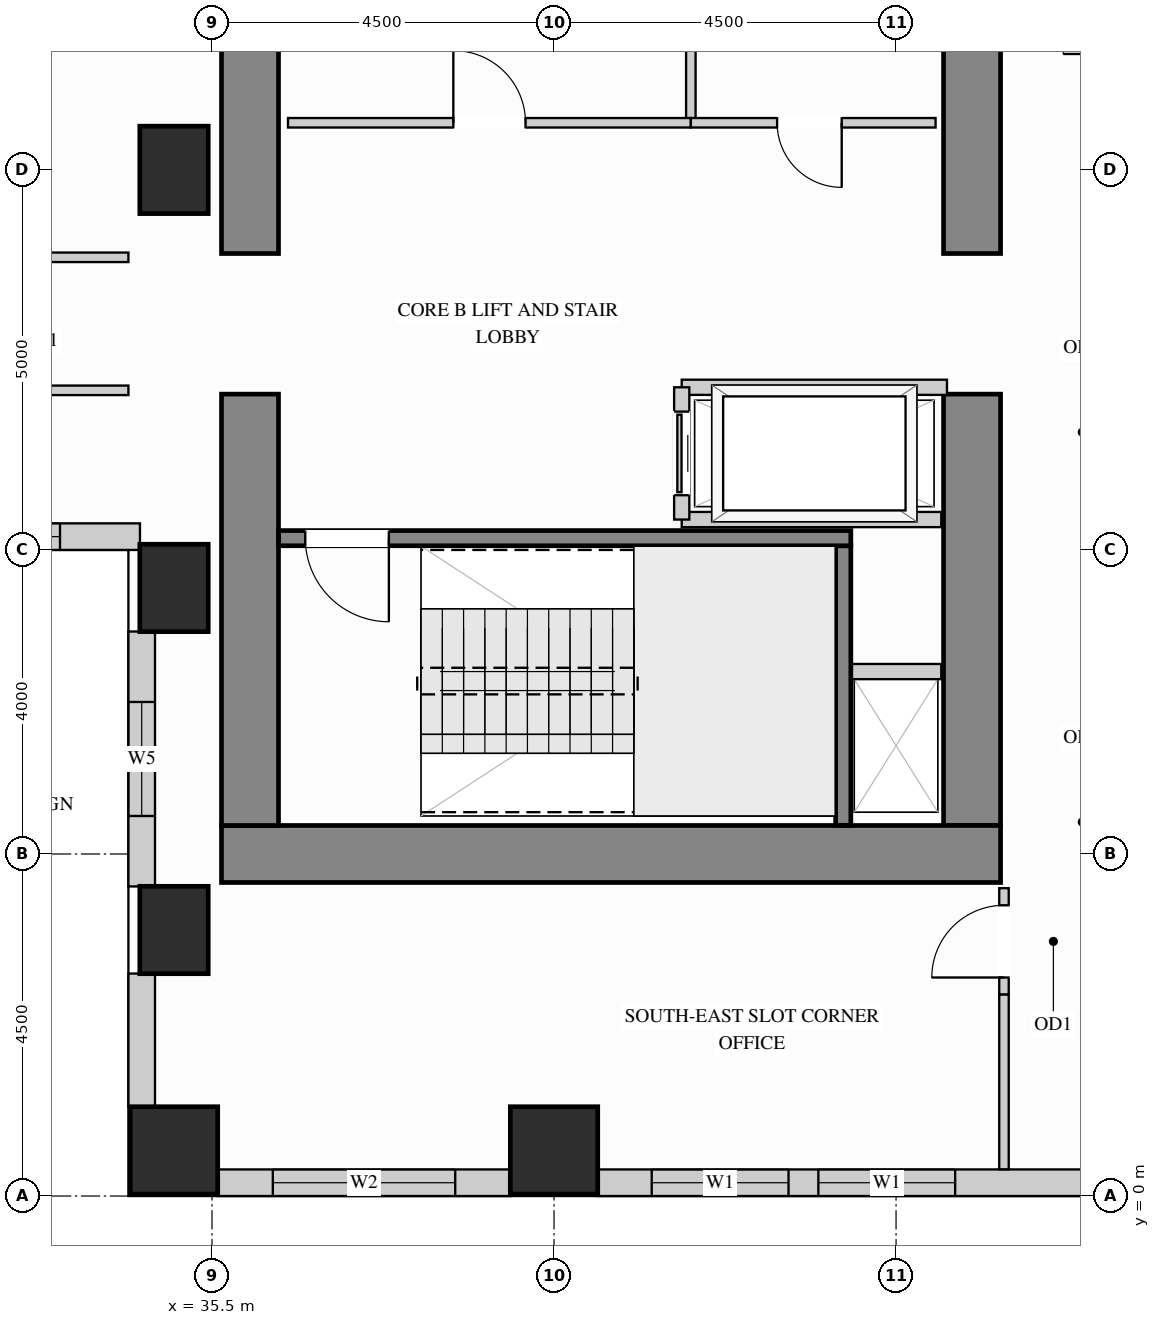
"""IFC4 building model, lengths in metres.
Left out: names, types, materials, properties, quantities, classifications, styles, units other than length and angle.
Written with IfcOpenShell. Run it as: python <this file> out.ifc"""

import sys

from ifc_helpers import new_model, si_unit, direction, frame, frame_2d, origin, origin_2d, place, context, subcontext, project, spatial, rectangle, extrude, source, transform, mapped, element, fill, save


model = new_model("IFC4")
c1 = context("Model", 3, precision=1e-05, world=origin(), true_north=direction((0.0, 1.0)))
c2 = subcontext(c1, "Body", "Model", "MODEL_VIEW")
j1 = project(units=[si_unit("LENGTHUNIT", "METRE"), si_unit("PLANEANGLEUNIT", "RADIAN")], contexts=[c1])
p1 = place(None, origin())
s1 = spatial("IfcSite", under=j1, at=p1, CompositionType="ELEMENT")
p2 = place(p1, origin())
s2 = spatial("IfcBuilding", under=s1, at=p2, CompositionType="ELEMENT")
p3 = place(p2, frame((0.0, 0.0, 109.8)))
s3 = spatial("IfcBuildingStorey", under=s2, at=p3, CompositionType="ELEMENT", Elevation=109.8)
m1 = source(origin(), c2, "Body", "SweptSolid", [
    extrude(rectangle(XDim=0.9, YDim=1.15, at=origin_2d()), origin(), (0.0, 0.0, 1.0), 3.38),
])
for number, where, z_axis, x_axis in (
    (1, (35.0, 13.5, 0.0), (0.0, 0.0, 1.0), (1.0, 0.0, 0.0)),
    (2, (35.0, 3.5, 0.0), (0.0, 0.0, 1.0), (1.0, 0.0, 0.0)),
    (3, (35.0, 8.0, 0.0), (0.0, 0.0, 1.0), (1.0, 0.0, 0.0)),
):
    element("IfcColumn", number, at=place(p3, frame(where, z_axis=z_axis, x_axis=x_axis)), inside=s3, PredefinedType="COLUMN", context=c2, shape_type="MappedRepresentation", body=[
        mapped(m1, transform((0.0, 0.0, 0.0), x_axis=(1.0, 0.0, 0.0), y_axis=(0.0, 1.0, 0.0), z_axis=(0.0, 0.0, 1.0))),
    ])
m2 = source(origin(), c2, "Body", "SweptSolid", [
    extrude(rectangle(XDim=1.15, YDim=1.15, at=origin_2d()), origin(), (0.0, 0.0, 1.0), 3.38),
])
for number, where, z_axis, x_axis in (
    (4, (35.0, 0.6, 0.0), (0.0, 0.0, 1.0), (1.0, 0.0, 0.0)),
    (5, (40.0, 0.6, 0.0), (0.0, 0.0, 1.0), (1.0, 0.0, 0.0)),
):
    element("IfcColumn", number, at=place(p3, frame(where, z_axis=z_axis, x_axis=x_axis)), inside=s3, PredefinedType="COLUMN", context=c2, shape_type="MappedRepresentation", body=[
        mapped(m2, transform((0.0, 0.0, 0.0), x_axis=(1.0, 0.0, 0.0), y_axis=(0.0, 1.0, 0.0), z_axis=(0.0, 0.0, 1.0))),
    ])
m3 = source(origin(), c2, "Body", "SweptSolid", [
    extrude(rectangle(XDim=5.675, YDim=0.75, at=frame_2d((2.837, 0.0))), origin(), (0.0, 0.0, 1.0), 3.38),
])
p4 = place(p3, frame((45.5, 4.875, 0.0), z_axis=(0.0, 0.0, 1.0), x_axis=(0.0, 1.0, 0.0)))
e6 = element("IfcWall", 6, at=p4, inside=s3, PredefinedType="SHEAR", context=c2, shape_type="MappedRepresentation", body=[
    mapped(m3, transform((0.0, 0.0, 0.0), x_axis=(1.0, 0.0, 0.0), y_axis=(0.0, 1.0, 0.0), z_axis=(0.0, 0.0, 1.0))),
])
m4 = source(origin(), c2, "Body", "SweptSolid", [
    extrude(rectangle(XDim=3.725, YDim=0.75, at=frame_2d((1.863, 0.0))), origin(), (0.0, 0.0, 1.0), 3.38),
])
p5 = place(p3, frame((45.5, 12.4, 0.0), z_axis=(0.0, 0.0, 1.0), x_axis=(0.0, 1.0, 0.0)))
e7 = element("IfcWall", 7, at=p5, inside=s3, PredefinedType="SHEAR", context=c2, shape_type="MappedRepresentation", body=[
    mapped(m4, transform((0.0, 0.0, 0.0), x_axis=(1.0, 0.0, 0.0), y_axis=(0.0, 1.0, 0.0), z_axis=(0.0, 0.0, 1.0))),
])
m5 = source(origin(), c2, "Body", "SweptSolid", [
    extrude(rectangle(XDim=10.25, YDim=0.75, at=frame_2d((5.125, 0.0))), origin(), (0.0, 0.0, 1.0), 3.38),
])
p6 = place(p3, frame((35.625, 4.5, 0.0), z_axis=(0.0, 0.0, 1.0), x_axis=(1.0, 0.0, 0.0)))
e8 = element("IfcWall", 8, at=p6, inside=s3, PredefinedType="SHEAR", context=c2, shape_type="MappedRepresentation", body=[
    mapped(m5, transform((0.0, 0.0, 0.0), x_axis=(1.0, 0.0, 0.0), y_axis=(0.0, 1.0, 0.0), z_axis=(0.0, 0.0, 1.0))),
])
p7 = place(p3, frame((36.0, 4.875, 0.0), z_axis=(0.0, 0.0, 1.0), x_axis=(0.0, 1.0, 0.0)))
e9 = element("IfcWall", 9, at=p7, inside=s3, PredefinedType="SHEAR", context=c2, shape_type="MappedRepresentation", body=[
    mapped(m3, transform((0.0, 0.0, 0.0), x_axis=(1.0, 0.0, 0.0), y_axis=(0.0, 1.0, 0.0), z_axis=(0.0, 0.0, 1.0))),
])
p8 = place(p3, frame((36.0, 12.4, 0.0), z_axis=(0.0, 0.0, 1.0), x_axis=(0.0, 1.0, 0.0)))
e10 = element("IfcWall", 10, at=p8, inside=s3, PredefinedType="SHEAR", context=c2, shape_type="MappedRepresentation", body=[
    mapped(m4, transform((0.0, 0.0, 0.0), x_axis=(1.0, 0.0, 0.0), y_axis=(0.0, 1.0, 0.0), z_axis=(0.0, 0.0, 1.0))),
])
p9 = place(p3, frame((30.948, 8.675, 0.0), z_axis=(0.0, 0.0, 1.0), x_axis=(1.0, 0.0, 0.0)))
e11 = element("IfcWall", 11, at=p9, inside=s3, PredefinedType="SOLIDWALL", context=c2, shape_type="SweptSolid", body=[
    extrude(rectangle(XDim=3.604, YDim=0.35, at=frame_2d((1.802, 0.0))), origin(), (0.0, 0.0, 1.0), 3.365),
])
p10 = place(p9, frame((1.052, 0.0, 0.78)))
e12 = element("IfcOpeningElement", 12, at=p10, cuts=e11, PredefinedType="OPENING", context=c2, shape_type="SweptSolid", body=[
    extrude(rectangle(XDim=1.5, YDim=2.0, at=frame_2d((0.75, 1.0))), frame((0.0, 0.185, 0.0), z_axis=(0.0, -1.0, 0.0), x_axis=(1.0, 0.0, 0.0)), (0.0, 0.0, 1.0), 0.37),
])
p11 = place(p3, frame((34.575, 7.427, 0.0), z_axis=(0.0, 0.0, 1.0), x_axis=(0.0, -1.0, 0.0)))
e13 = element("IfcWall", 13, at=p11, inside=s3, PredefinedType="SOLIDWALL", context=c2, shape_type="SweptSolid", body=[
    extrude(rectangle(XDim=3.354, YDim=0.35, at=frame_2d((1.677, 0.0))), origin(), (0.0, 0.0, 1.0), 3.365),
])
p12 = place(p11, frame((0.927, 0.0, 0.78)))
e14 = element("IfcOpeningElement", 14, at=p12, cuts=e13, PredefinedType="OPENING", context=c2, shape_type="SweptSolid", body=[
    extrude(rectangle(XDim=1.5, YDim=2.0, at=frame_2d((0.75, 1.0))), frame((0.0, 0.185, 0.0), z_axis=(0.0, -1.0, 0.0), x_axis=(1.0, 0.0, 0.0)), (0.0, 0.0, 1.0), 0.37),
])
m6 = source(origin(), c2, "Body", "SweptSolid", [
    extrude(rectangle(XDim=1.754, YDim=0.35, at=frame_2d((0.877, 0.0))), origin(), (0.0, 0.0, 1.0), 3.365),
])
p13 = place(p3, frame((34.575, 2.927, 0.0), z_axis=(0.0, 0.0, 1.0), x_axis=(0.0, -1.0, 0.0)))
e15 = element("IfcWall", 15, at=p13, inside=s3, PredefinedType="SOLIDWALL", context=c2, shape_type="MappedRepresentation", body=[
    mapped(m6, transform((0.0, 0.0, 0.0), x_axis=(1.0, 0.0, 0.0), y_axis=(0.0, 1.0, 0.0), z_axis=(0.0, 0.0, 1.0))),
])
p14 = place(p3, frame((35.573, 0.175, 0.0), z_axis=(0.0, 0.0, 1.0), x_axis=(1.0, 0.0, 0.0)))
e16 = element("IfcWall", 16, at=p14, inside=s3, PredefinedType="SOLIDWALL", context=c2, shape_type="SweptSolid", body=[
    extrude(rectangle(XDim=3.854, YDim=0.35, at=frame_2d((1.927, 0.0))), origin(), (0.0, 0.0, 1.0), 3.365),
])
p15 = place(p14, frame((0.727, 0.0, 0.78)))
e17 = element("IfcOpeningElement", 17, at=p15, cuts=e16, PredefinedType="OPENING", context=c2, shape_type="SweptSolid", body=[
    extrude(rectangle(XDim=2.4, YDim=2.1, at=frame_2d((1.2, 1.05))), frame((0.0, 0.185, 0.0), z_axis=(0.0, -1.0, 0.0), x_axis=(1.0, 0.0, 0.0)), (0.0, 0.0, 1.0), 0.37),
])
p16 = place(p3, frame((40.573, 0.175, 0.0), z_axis=(0.0, 0.0, 1.0), x_axis=(1.0, 0.0, 0.0)))
e18 = element("IfcWall", 18, at=p16, inside=s3, PredefinedType="SOLIDWALL", context=c2, shape_type="SweptSolid", body=[
    extrude(rectangle(XDim=6.454, YDim=0.35, at=frame_2d((3.227, 0.0))), origin(), (0.0, 0.0, 1.0), 3.365),
])
p17 = place(p16, frame((0.712, 0.0, 0.78)))
e19 = element("IfcOpeningElement", 19, at=p17, cuts=e18, PredefinedType="OPENING", context=c2, shape_type="SweptSolid", body=[
    extrude(rectangle(XDim=1.8, YDim=2.1, at=frame_2d((0.9, 1.05))), frame((0.0, 0.185, 0.0), z_axis=(0.0, -1.0, 0.0), x_axis=(1.0, 0.0, 0.0)), (0.0, 0.0, 1.0), 0.37),
])
p18 = place(p16, frame((2.905, 0.0, 0.78)))
e20 = element("IfcOpeningElement", 20, at=p18, cuts=e18, PredefinedType="OPENING", context=c2, shape_type="SweptSolid", body=[
    extrude(rectangle(XDim=1.8, YDim=2.1, at=frame_2d((0.9, 1.05))), frame((0.0, 0.185, 0.0), z_axis=(0.0, -1.0, 0.0), x_axis=(1.0, 0.0, 0.0)), (0.0, 0.0, 1.0), 0.37),
])
m7 = source(origin(), c2, "Body", "SweptSolid", [
    extrude(rectangle(XDim=1.93, YDim=0.125, at=frame_2d((0.965, 0.0))), origin(), (0.0, 0.0, 1.0), 3.365),
])
p19 = place(p3, frame((41.8, 14.12, 0.0), z_axis=(0.0, 0.0, 1.0), x_axis=(0.0, 1.0, 0.0)))
e21 = element("IfcWall", 21, at=p19, inside=s3, PredefinedType="PARTITIONING", context=c2, shape_type="MappedRepresentation", body=[
    mapped(m7, transform((0.0, 0.0, 0.0), x_axis=(1.0, 0.0, 0.0), y_axis=(0.0, 1.0, 0.0), z_axis=(0.0, 0.0, 1.0))),
])
p20 = place(p3, frame((36.5, 14.12, 0.0), z_axis=(0.0, 0.0, 1.0), x_axis=(1.0, 0.0, 0.0)))
e22 = element("IfcWall", 22, at=p20, inside=s3, PredefinedType="PARTITIONING", context=c2, shape_type="SweptSolid", body=[
    extrude(rectangle(XDim=5.3, YDim=0.125, at=frame_2d((2.65, 0.0))), origin(), (0.0, 0.0, 1.0), 3.365),
])
p21 = place(p20, frame((2.175, 0.0, 0.0)))
e23 = element("IfcOpeningElement", 23, at=p21, cuts=e22, PredefinedType="OPENING", context=c2, shape_type="SweptSolid", body=[
    extrude(rectangle(XDim=0.95, YDim=2.15, at=frame_2d((0.475, 1.075))), frame((0.0, 0.073, 0.0), z_axis=(0.0, -1.0, 0.0), x_axis=(1.0, 0.0, 0.0)), (0.0, 0.0, 1.0), 0.145),
])
p22 = place(p3, frame((41.8, 14.12, 0.0), z_axis=(0.0, 0.0, 1.0), x_axis=(1.0, 0.0, 0.0)))
e24 = element("IfcWall", 24, at=p22, inside=s3, PredefinedType="PARTITIONING", context=c2, shape_type="SweptSolid", body=[
    extrude(rectangle(XDim=3.22, YDim=0.125, at=frame_2d((1.61, 0.0))), origin(), (0.0, 0.0, 1.0), 3.365),
])
p23 = place(p22, frame((1.135, 0.0, 0.0)))
e25 = element("IfcOpeningElement", 25, at=p23, cuts=e24, PredefinedType="OPENING", context=c2, shape_type="SweptSolid", body=[
    extrude(rectangle(XDim=0.85, YDim=2.1, at=frame_2d((0.425, 1.05))), frame((0.0, 0.073, 0.0), z_axis=(0.0, -1.0, 0.0), x_axis=(1.0, 0.0, 0.0)), (0.0, 0.0, 1.0), 0.145),
])
p24 = place(p3, frame((45.92, 2.65, 0.0), z_axis=(0.0, 0.0, 1.0), x_axis=(0.0, 1.0, 0.0)))
e26 = element("IfcWall", 26, at=p24, inside=s3, PredefinedType="PARTITIONING", context=c2, shape_type="SweptSolid", body=[
    extrude(rectangle(XDim=1.4, YDim=0.125, at=frame_2d((0.7, 0.0))), origin(), (0.0, 0.0, 1.0), 3.365),
])
p25 = place(p24, frame((0.225, 0.0, 0.0)))
e27 = element("IfcOpeningElement", 27, at=p25, cuts=e26, PredefinedType="OPENING", context=c2, shape_type="SweptSolid", body=[
    extrude(rectangle(XDim=0.95, YDim=2.15, at=frame_2d((0.475, 1.075))), frame((0.0, 0.073, 0.0), z_axis=(0.0, -1.0, 0.0), x_axis=(1.0, 0.0, 0.0)), (0.0, 0.0, 1.0), 0.145),
])
m8 = source(origin(), c2, "Body", "SweptSolid", [
    extrude(rectangle(XDim=2.298, YDim=0.125, at=frame_2d((1.149, 0.0))), origin(), (0.0, 0.0, 1.0), 3.365),
])
p26 = place(p3, frame((45.92, 0.352, 0.0), z_axis=(0.0, 0.0, 1.0), x_axis=(0.0, 1.0, 0.0)))
e28 = element("IfcWall", 28, at=p26, inside=s3, PredefinedType="PARTITIONING", context=c2, shape_type="MappedRepresentation", body=[
    mapped(m8, transform((0.0, 0.0, 0.0), x_axis=(1.0, 0.0, 0.0), y_axis=(0.0, 1.0, 0.0), z_axis=(0.0, 0.0, 1.0))),
])
p27 = place(p3, frame((29.85, 12.35, 0.0), z_axis=(0.0, 0.0, 1.0), x_axis=(1.0, 0.0, 0.0)))
e29 = element("IfcWall", 29, at=p27, inside=s3, PredefinedType="PARTITIONING", context=c2, shape_type="SweptSolid", body=[
    extrude(rectangle(XDim=4.55, YDim=0.125, at=frame_2d((2.275, 0.0))), origin(), (0.0, 0.0, 1.0), 3.365),
])
p28 = place(p27, frame((1.8, 0.0, 0.0)))
e30 = element("IfcOpeningElement", 30, at=p28, cuts=e29, PredefinedType="OPENING", context=c2, shape_type="SweptSolid", body=[
    extrude(rectangle(XDim=0.95, YDim=2.15, at=frame_2d((0.475, 1.075))), frame((0.0, 0.073, 0.0), z_axis=(0.0, -1.0, 0.0), x_axis=(1.0, 0.0, 0.0)), (0.0, 0.0, 1.0), 0.145),
])
p29 = place(p3, frame((29.85, 10.6, 0.0), z_axis=(0.0, 0.0, 1.0), x_axis=(1.0, 0.0, 0.0)))
e31 = element("IfcWall", 31, at=p29, inside=s3, PredefinedType="PARTITIONING", context=c2, shape_type="SweptSolid", body=[
    extrude(rectangle(XDim=4.55, YDim=0.125, at=frame_2d((2.275, 0.0))), origin(), (0.0, 0.0, 1.0), 3.365),
])
p30 = place(p29, frame((1.8, 0.0, 0.0)))
e32 = element("IfcOpeningElement", 32, at=p30, cuts=e31, PredefinedType="OPENING", context=c2, shape_type="SweptSolid", body=[
    extrude(rectangle(XDim=0.95, YDim=2.15, at=frame_2d((0.475, 1.075))), frame((0.0, 0.073, 0.0), z_axis=(0.0, -1.0, 0.0), x_axis=(1.0, 0.0, 0.0)), (0.0, 0.0, 1.0), 0.145),
])
m9 = source(origin(), c2, "Body", "SweptSolid", [
    extrude(rectangle(XDim=1.245, YDim=0.2, at=frame_2d((0.623, 0.0))), origin(), (0.0, 0.0, 1.0), 3.365),
])
p31 = place(p3, frame((43.85, 6.9, 0.0), z_axis=(0.0, 0.0, 1.0), x_axis=(1.0, 0.0, 0.0)))
e33 = element("IfcWall", 33, at=p31, inside=s3, PredefinedType="PARTITIONING", context=c2, shape_type="MappedRepresentation", body=[
    mapped(m9, transform((0.0, 0.0, 0.0), x_axis=(1.0, 0.0, 0.0), y_axis=(0.0, 1.0, 0.0), z_axis=(0.0, 0.0, 1.0))),
])
m10 = source(origin(), c2, "Body", "SweptSolid", [
    extrude(rectangle(XDim=3.49, YDim=0.2, at=frame_2d((1.745, 0.0))), origin(), (0.0, 0.0, 1.0), 3.365),
])
p32 = place(p3, frame((41.68, 10.64, 0.0), z_axis=(0.0, 0.0, 1.0), x_axis=(1.0, 0.0, 0.0)))
e34 = element("IfcWall", 34, at=p32, inside=s3, PredefinedType="PARTITIONING", context=c2, shape_type="MappedRepresentation", body=[
    mapped(m10, transform((0.0, 0.0, 0.0), x_axis=(1.0, 0.0, 0.0), y_axis=(0.0, 1.0, 0.0), z_axis=(0.0, 0.0, 1.0))),
])
m11 = source(origin(), c2, "Body", "SweptSolid", [
    extrude(rectangle(XDim=3.415, YDim=0.2, at=frame_2d((1.708, 0.0))), origin(), (0.0, 0.0, 1.0), 3.365),
])
p33 = place(p3, frame((41.68, 8.9, 0.0), z_axis=(0.0, 0.0, 1.0), x_axis=(1.0, 0.0, 0.0)))
e35 = element("IfcWall", 35, at=p33, inside=s3, PredefinedType="PARTITIONING", context=c2, shape_type="MappedRepresentation", body=[
    mapped(m11, transform((0.0, 0.0, 0.0), x_axis=(1.0, 0.0, 0.0), y_axis=(0.0, 1.0, 0.0), z_axis=(0.0, 0.0, 1.0))),
])
p34 = place(p3, frame((41.68, 8.9, 0.0), z_axis=(0.0, 0.0, 1.0), x_axis=(0.0, 1.0, 0.0)))
e36 = element("IfcWall", 36, at=p34, inside=s3, PredefinedType="PARTITIONING", context=c2, shape_type="SweptSolid", body=[
    extrude(rectangle(XDim=1.74, YDim=0.2, at=frame_2d((0.87, 0.0))), origin(), (0.0, 0.0, 1.0), 3.365),
])
p35 = place(p34, frame((0.32, 0.0, 0.0)))
e37 = element("IfcOpeningElement", 37, at=p35, cuts=e36, PredefinedType="OPENING", context=c2, shape_type="SweptSolid", body=[
    extrude(rectangle(XDim=1.1, YDim=2.2, at=frame_2d((0.55, 1.1))), frame((0.0, 0.11, 0.0), z_axis=(0.0, -1.0, 0.0), x_axis=(1.0, 0.0, 0.0)), (0.0, 0.0, 1.0), 0.22),
])
m12 = source(origin(), c2, "Body", "SweptSolid", [
    extrude(rectangle(XDim=3.678, YDim=0.2, at=frame_2d((1.839, 0.0))), origin(), (0.0, 0.0, 1.0), 3.38),
])
p36 = place(p3, frame((43.805, 4.877, 0.0), z_axis=(0.0, 0.0, 1.0), x_axis=(0.0, 1.0, 0.0)))
e38 = element("IfcWall", 38, at=p36, inside=s3, PredefinedType="SHEAR", context=c2, shape_type="MappedRepresentation", body=[
    mapped(m12, transform((0.0, 0.0, 0.0), x_axis=(1.0, 0.0, 0.0), y_axis=(0.0, 1.0, 0.0), z_axis=(0.0, 0.0, 1.0))),
])
p37 = place(p3, frame((36.377, 8.655, 0.0), z_axis=(0.0, 0.0, 1.0), x_axis=(1.0, 0.0, 0.0)))
e39 = element("IfcWall", 39, at=p37, inside=s3, PredefinedType="SHEAR", context=c2, shape_type="SweptSolid", body=[
    extrude(rectangle(XDim=7.528, YDim=0.2, at=frame_2d((3.764, 0.0))), origin(), (0.0, 0.0, 1.0), 3.38),
])
p38 = place(p37, frame((0.35, 0.0, 0.0)))
e40 = element("IfcOpeningElement", 40, at=p38, cuts=e39, PredefinedType="OPENING", context=c2, shape_type="SweptSolid", body=[
    extrude(rectangle(XDim=1.1, YDim=2.15, at=frame_2d((0.55, 1.075))), frame((0.0, 0.11, 0.0), z_axis=(0.0, -1.0, 0.0), x_axis=(1.0, 0.0, 0.0)), (0.0, 0.0, 1.0), 0.22),
])
m13 = source(origin(), c2, "Body", "SweptSolid", [
    extrude(rectangle(XDim=1.1, YDim=2.2, at=frame_2d((0.55, 1.1))), frame((0.0, 0.025, 0.0), z_axis=(0.0, -1.0, 0.0), x_axis=(1.0, 0.0, 0.0)), (0.0, 0.0, 1.0), 0.05),
])
p39 = place(p35, origin())
e41 = element("IfcDoor", 41, at=p39, inside=s3, OperationType="SLIDING_TO_LEFT", PredefinedType="DOOR", context=c2, shape_type="MappedRepresentation", body=[
    mapped(m13, transform((0.0, 0.0, 0.0), x_axis=(1.0, 0.0, 0.0), y_axis=(0.0, 1.0, 0.0), z_axis=(0.0, 0.0, 1.0))),
])
fill(e37, e41)
m14 = source(origin(), c2, "Body", "SweptSolid", [
    extrude(rectangle(XDim=0.95, YDim=2.15, at=frame_2d((0.475, 1.075))), frame((0.0, 0.025, 0.0), z_axis=(0.0, -1.0, 0.0), x_axis=(1.0, 0.0, 0.0)), (0.0, 0.0, 1.0), 0.05),
])
p40 = place(p21, origin())
e42 = element("IfcDoor", 42, at=p40, inside=s3, OperationType="SINGLE_SWING_LEFT", PredefinedType="DOOR", context=c2, shape_type="MappedRepresentation", body=[
    mapped(m14, transform((0.0, 0.0, 0.0), x_axis=(1.0, 0.0, 0.0), y_axis=(0.0, 1.0, 0.0), z_axis=(0.0, 0.0, 1.0))),
])
fill(e23, e42)
p41 = place(p25, origin())
e43 = element("IfcDoor", 43, at=p41, inside=s3, OperationType="SINGLE_SWING_LEFT", PredefinedType="DOOR", context=c2, shape_type="MappedRepresentation", body=[
    mapped(m14, transform((0.0, 0.0, 0.0), x_axis=(1.0, 0.0, 0.0), y_axis=(0.0, 1.0, 0.0), z_axis=(0.0, 0.0, 1.0))),
])
fill(e27, e43)
m15 = source(origin(), c2, "Body", "SweptSolid", [
    extrude(rectangle(XDim=0.85, YDim=2.1, at=frame_2d((0.425, 1.05))), frame((0.0, 0.025, 0.0), z_axis=(0.0, -1.0, 0.0), x_axis=(1.0, 0.0, 0.0)), (0.0, 0.0, 1.0), 0.05),
])
p42 = place(p23, origin())
e44 = element("IfcDoor", 44, at=p42, inside=s3, OperationType="SINGLE_SWING_RIGHT", PredefinedType="DOOR", context=c2, shape_type="MappedRepresentation", body=[
    mapped(m15, transform((0.0, 0.0, 0.0), x_axis=(1.0, 0.0, 0.0), y_axis=(0.0, 1.0, 0.0), z_axis=(0.0, 0.0, 1.0))),
])
fill(e25, e44)
m16 = source(origin(), c2, "Body", "SweptSolid", [
    extrude(rectangle(XDim=1.1, YDim=2.15, at=frame_2d((0.55, 1.075))), frame((0.0, 0.025, 0.0), z_axis=(0.0, -1.0, 0.0), x_axis=(1.0, 0.0, 0.0)), (0.0, 0.0, 1.0), 0.05),
])
p43 = place(p38, origin())
e45 = element("IfcDoor", 45, at=p43, inside=s3, OperationType="SINGLE_SWING_RIGHT", PredefinedType="DOOR", context=c2, shape_type="MappedRepresentation", body=[
    mapped(m16, transform((0.0, 0.0, 0.0), x_axis=(1.0, 0.0, 0.0), y_axis=(0.0, 1.0, 0.0), z_axis=(0.0, 0.0, 1.0))),
])
fill(e40, e45)
m17 = source(origin(), c2, "Body", "SweptSolid", [
    extrude(rectangle(XDim=1.8, YDim=2.1, at=frame_2d((0.9, 1.05))), frame((0.0, 0.03, 0.0), z_axis=(0.0, -1.0, 0.0), x_axis=(1.0, 0.0, 0.0)), (0.0, 0.0, 1.0), 0.06),
])
p44 = place(p17, origin())
e46 = element("IfcWindow", 46, at=p44, inside=s3, PartitioningType="SINGLE_PANEL", PredefinedType="WINDOW", context=c2, shape_type="MappedRepresentation", body=[
    mapped(m17, transform((0.0, 0.0, 0.0), x_axis=(1.0, 0.0, 0.0), y_axis=(0.0, 1.0, 0.0), z_axis=(0.0, 0.0, 1.0))),
])
fill(e19, e46)
p45 = place(p18, origin())
e47 = element("IfcWindow", 47, at=p45, inside=s3, PartitioningType="SINGLE_PANEL", PredefinedType="WINDOW", context=c2, shape_type="MappedRepresentation", body=[
    mapped(m17, transform((0.0, 0.0, 0.0), x_axis=(1.0, 0.0, 0.0), y_axis=(0.0, 1.0, 0.0), z_axis=(0.0, 0.0, 1.0))),
])
fill(e20, e47)
m18 = source(origin(), c2, "Body", "SweptSolid", [
    extrude(rectangle(XDim=2.4, YDim=2.1, at=frame_2d((1.2, 1.05))), frame((0.0, 0.03, 0.0), z_axis=(0.0, -1.0, 0.0), x_axis=(1.0, 0.0, 0.0)), (0.0, 0.0, 1.0), 0.06),
])
p46 = place(p15, origin())
e48 = element("IfcWindow", 48, at=p46, inside=s3, PartitioningType="SINGLE_PANEL", PredefinedType="WINDOW", context=c2, shape_type="MappedRepresentation", body=[
    mapped(m18, transform((0.0, 0.0, 0.0), x_axis=(1.0, 0.0, 0.0), y_axis=(0.0, 1.0, 0.0), z_axis=(0.0, 0.0, 1.0))),
])
fill(e17, e48)
m19 = source(origin(), c2, "Body", "SweptSolid", [
    extrude(rectangle(XDim=1.5, YDim=2.0, at=frame_2d((0.75, 1.0))), frame((0.0, 0.03, 0.0), z_axis=(0.0, -1.0, 0.0), x_axis=(1.0, 0.0, 0.0)), (0.0, 0.0, 1.0), 0.06),
])
p47 = place(p10, origin())
e49 = element("IfcWindow", 49, at=p47, inside=s3, PartitioningType="SINGLE_PANEL", PredefinedType="WINDOW", context=c2, shape_type="MappedRepresentation", body=[
    mapped(m19, transform((0.0, 0.0, 0.0), x_axis=(1.0, 0.0, 0.0), y_axis=(0.0, 1.0, 0.0), z_axis=(0.0, 0.0, 1.0))),
])
fill(e12, e49)
p48 = place(p12, origin())
e50 = element("IfcWindow", 50, at=p48, inside=s3, PartitioningType="SINGLE_PANEL", PredefinedType="WINDOW", context=c2, shape_type="MappedRepresentation", body=[
    mapped(m19, transform((0.0, 0.0, 0.0), x_axis=(1.0, 0.0, 0.0), y_axis=(0.0, 1.0, 0.0), z_axis=(0.0, 0.0, 1.0))),
])
fill(e14, e50)
save(model, sys.argv[1])
